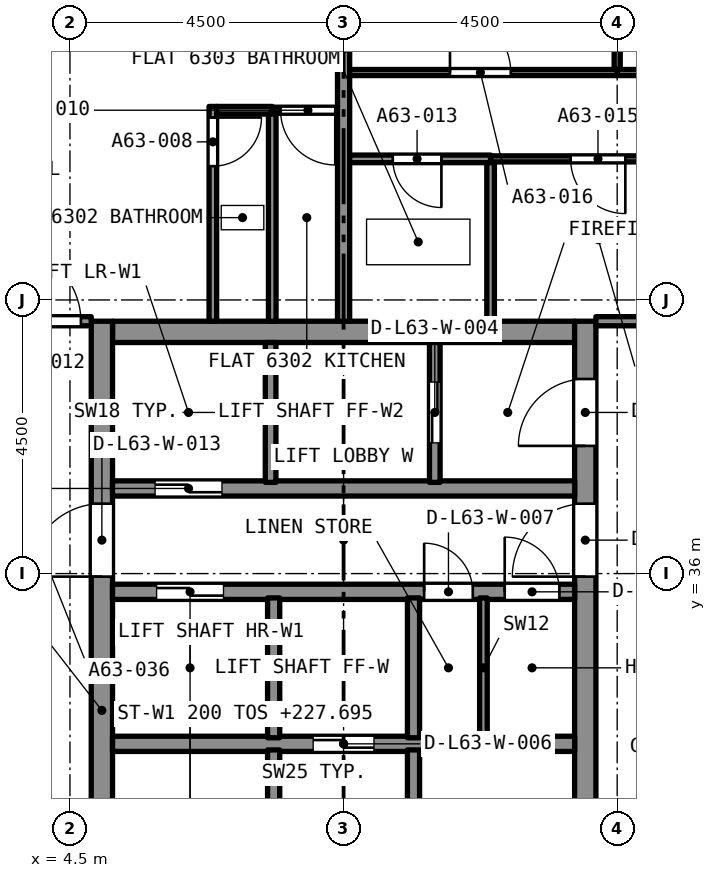
"""IFC4 building model, lengths in metres.
Left out: names, types, materials, properties, quantities, classifications, styles, units other than length and angle.
Written with IfcOpenShell. Run it as: python <this file> out.ifc"""

import sys

from ifc_helpers import new_model, si_unit, direction, frame, frame_2d, origin, place, context, subcontext, project, spatial, rectangle, extrude, element, fill, save


model = new_model("IFC4")
c1 = context("Model", 3, precision=1e-05, world=origin(), true_north=direction((0.0, 1.0)))
c2 = subcontext(c1, "Body", "Model", "MODEL_VIEW")
j1 = project(units=[si_unit("LENGTHUNIT", "METRE"), si_unit("PLANEANGLEUNIT", "RADIAN")], contexts=[c1])
p1 = place(None, origin())
s1 = spatial("IfcSite", under=j1, at=p1, CompositionType="ELEMENT")
p2 = place(p1, origin())
s2 = spatial("IfcBuilding", under=s1, at=p2, CompositionType="ELEMENT")
p3 = place(p2, frame((0.0, 0.0, 226.095)))
s3 = spatial("IfcBuildingStorey", under=s2, at=p3, CompositionType="ELEMENT", Elevation=226.095)
p4 = place(p3, frame((5.2, 39.975, 0.0), z_axis=(0.0, 0.0, 1.0), x_axis=(1.0, 0.0, 0.0)))
e1 = element("IfcWall", 1, at=p4, inside=s3, PredefinedType="SOLIDWALL", context=c2, shape_type="SweptSolid", body=[
    extrude(rectangle(XDim=7.6, YDim=0.35, at=frame_2d((3.8, 0.0))), origin(), (0.0, 0.0, 1.0), 3.2),
])
p5 = place(p3, frame((5.025, 27.35, 0.0), z_axis=(0.0, 0.0, 1.0), x_axis=(0.0, 1.0, 0.0)))
e2 = element("IfcWall", 2, at=p5, inside=s3, PredefinedType="SOLIDWALL", context=c2, shape_type="SweptSolid", body=[
    extrude(rectangle(XDim=12.8, YDim=0.35, at=frame_2d((6.4, 0.0))), origin(), (0.0, 0.0, 1.0), 3.2),
])
p6 = place(p5, frame((8.6, 0.0, 0.0)))
e3 = element("IfcOpeningElement", 3, at=p6, cuts=e2, PredefinedType="OPENING", context=c2, shape_type="SweptSolid", body=[
    extrude(rectangle(XDim=1.2, YDim=2.1, at=frame_2d((0.6, 1.05))), frame((0.0, 0.185, 0.0), z_axis=(0.0, -1.0, 0.0), x_axis=(1.0, 0.0, 0.0)), (0.0, 0.0, 1.0), 0.37),
])
p7 = place(p3, frame((12.975, 27.35, 0.0), z_axis=(0.0, 0.0, 1.0), x_axis=(0.0, 1.0, 0.0)))
e4 = element("IfcWall", 4, at=p7, inside=s3, PredefinedType="SOLIDWALL", context=c2, shape_type="SweptSolid", body=[
    extrude(rectangle(XDim=12.8, YDim=0.35, at=frame_2d((6.4, 0.0))), origin(), (0.0, 0.0, 1.0), 3.2),
])
p8 = place(p7, frame((10.75, 0.0, 0.0)))
e5 = element("IfcOpeningElement", 5, at=p8, cuts=e4, PredefinedType="OPENING", context=c2, shape_type="SweptSolid", body=[
    extrude(rectangle(XDim=1.1, YDim=2.1, at=frame_2d((0.55, 1.05))), frame((0.0, 0.185, 0.0), z_axis=(0.0, -1.0, 0.0), x_axis=(1.0, 0.0, 0.0)), (0.0, 0.0, 1.0), 0.37),
])
p9 = place(p7, frame((8.6, 0.0, 0.0)))
e6 = element("IfcOpeningElement", 6, at=p9, cuts=e4, PredefinedType="OPENING", context=c2, shape_type="SweptSolid", body=[
    extrude(rectangle(XDim=1.2, YDim=2.1, at=frame_2d((0.6, 1.05))), frame((0.0, 0.185, 0.0), z_axis=(0.0, -1.0, 0.0), x_axis=(1.0, 0.0, 0.0)), (0.0, 0.0, 1.0), 0.37),
])
p10 = place(p3, frame((6.85, 43.683, 0.0), z_axis=(0.0, 0.0, 1.0), x_axis=(0.0, -1.0, 0.0)))
e7 = element("IfcWall", 7, at=p10, inside=s3, PredefinedType="PARTITIONING", context=c2, shape_type="SweptSolid", body=[
    extrude(rectangle(XDim=3.533, YDim=0.125, at=frame_2d((1.766, 0.0))), origin(), (0.0, 0.0, 1.0), 2.9),
])
p11 = place(p10, frame((0.183, 0.0, 0.0)))
e8 = element("IfcOpeningElement", 8, at=p11, cuts=e7, PredefinedType="OPENING", context=c2, shape_type="SweptSolid", body=[
    extrude(rectangle(XDim=0.8, YDim=2.1, at=frame_2d((0.4, 1.05))), frame((0.0, 0.073, 0.0), z_axis=(0.0, -1.0, 0.0), x_axis=(1.0, 0.0, 0.0)), (0.0, 0.0, 1.0), 0.145),
])
p12 = place(p3, frame((6.913, 43.62, 0.0), z_axis=(0.0, 0.0, 1.0), x_axis=(1.0, 0.0, 0.0)))
e9 = element("IfcWall", 9, at=p12, inside=s3, PredefinedType="PARTITIONING", context=c2, shape_type="SweptSolid", body=[
    extrude(rectangle(XDim=0.915, YDim=0.125, at=frame_2d((0.458, 0.0))), origin(), (0.0, 0.0, 1.0), 2.9),
])
p13 = place(p3, frame((7.827, 40.15, 0.0), z_axis=(0.0, 0.0, 1.0), x_axis=(0.0, 1.0, 0.0)))
e10 = element("IfcWall", 10, at=p13, inside=s3, PredefinedType="PARTITIONING", context=c2, shape_type="SweptSolid", body=[
    extrude(rectangle(XDim=3.408, YDim=0.125, at=frame_2d((1.704, 0.0))), origin(), (0.0, 0.0, 1.0), 2.9),
])
p14 = place(p3, frame((8.9, 43.62, 0.0), z_axis=(0.0, 0.0, 1.0), x_axis=(-1.0, 0.0, 0.0)))
e11 = element("IfcWall", 11, at=p14, inside=s3, PredefinedType="PARTITIONING", context=c2, shape_type="SweptSolid", body=[
    extrude(rectangle(XDim=1.073, YDim=0.1, at=frame_2d((0.536, 0.0))), origin(), (0.0, 0.0, 1.0), 2.9),
])
p15 = place(p14, frame((0.036, 0.0, 0.0)))
e12 = element("IfcOpeningElement", 12, at=p15, cuts=e11, PredefinedType="OPENING", context=c2, shape_type="SweptSolid", body=[
    extrude(rectangle(XDim=0.9, YDim=2.1, at=frame_2d((0.45, 1.05))), frame((0.0, 0.06, 0.0), z_axis=(0.0, -1.0, 0.0), x_axis=(1.0, 0.0, 0.0)), (0.0, 0.0, 1.0), 0.12),
])
p16 = place(p3, frame((3.35, 40.15, 0.0), z_axis=(0.0, 0.0, 1.0), x_axis=(1.0, 0.0, 0.0)))
e13 = element("IfcWall", 13, at=p16, inside=s3, PredefinedType="PARTITIONING", context=c2, shape_type="SweptSolid", body=[
    extrude(rectangle(XDim=1.5, YDim=0.15, at=frame_2d((0.75, 0.0))), origin(), (0.0, 0.0, 1.0), 2.9),
])
p17 = place(p16, frame((0.13, 0.0, 0.0)))
e14 = element("IfcOpeningElement", 14, at=p17, cuts=e13, PredefinedType="OPENING", context=c2, shape_type="SweptSolid", body=[
    extrude(rectangle(XDim=1.2, YDim=2.4, at=frame_2d((0.6, 1.2))), frame((0.0, 0.085, 0.0), z_axis=(0.0, -1.0, 0.0), x_axis=(1.0, 0.0, 0.0)), (0.0, 0.0, 1.0), 0.17),
])
p18 = place(p3, frame((9.0, 40.15, 0.0), z_axis=(0.0, 0.0, 1.0), x_axis=(0.0, 1.0, 0.0)))
e15 = element("IfcWall", 15, at=p18, inside=s3, PredefinedType="PARTITIONING", context=c2, shape_type="SweptSolid", body=[
    extrude(rectangle(XDim=8.95, YDim=0.2, at=frame_2d((4.475, 0.0))), origin(), (0.0, 0.0, 1.0), 2.9),
])
p19 = place(p3, frame((11.418, 42.82, 0.0), z_axis=(0.0, 0.0, 1.0), x_axis=(-1.0, 0.0, 0.0)))
e16 = element("IfcWall", 16, at=p19, inside=s3, PredefinedType="PARTITIONING", context=c2, shape_type="SweptSolid", body=[
    extrude(rectangle(XDim=2.318, YDim=0.125, at=frame_2d((1.159, 0.0))), origin(), (0.0, 0.0, 1.0), 2.9),
])
p20 = place(p19, frame((0.809, 0.0, 0.0)))
e17 = element("IfcOpeningElement", 17, at=p20, cuts=e16, PredefinedType="OPENING", context=c2, shape_type="SweptSolid", body=[
    extrude(rectangle(XDim=0.8, YDim=2.1, at=frame_2d((0.4, 1.05))), frame((0.0, 0.073, 0.0), z_axis=(0.0, -1.0, 0.0), x_axis=(1.0, 0.0, 0.0)), (0.0, 0.0, 1.0), 0.145),
])
p21 = place(p3, frame((11.418, 40.15, 0.0), z_axis=(0.0, 0.0, 1.0), x_axis=(0.0, 1.0, 0.0)))
e18 = element("IfcWall", 18, at=p21, inside=s3, PredefinedType="PARTITIONING", context=c2, shape_type="SweptSolid", body=[
    extrude(rectangle(XDim=2.608, YDim=0.125, at=frame_2d((1.304, 0.0))), origin(), (0.0, 0.0, 1.0), 2.9),
])
p22 = place(p3, frame((13.5, 44.24, 0.0), z_axis=(0.0, 0.0, 1.0), x_axis=(1.0, 0.0, 0.0)))
e19 = element("IfcWall", 19, at=p22, inside=s3, PredefinedType="PARTITIONING", context=c2, shape_type="SweptSolid", body=[
    extrude(rectangle(XDim=4.375, YDim=0.1, at=frame_2d((2.188, 0.0))), origin(), (0.0, 0.0, 1.0), 2.9),
])
p23 = place(p22, frame((1.8, 0.0, 0.0)))
e20 = element("IfcOpeningElement", 20, at=p23, cuts=e19, PredefinedType="OPENING", context=c2, shape_type="SweptSolid", body=[
    extrude(rectangle(XDim=0.9, YDim=2.1, at=frame_2d((0.45, 1.05))), frame((0.0, 0.06, 0.0), z_axis=(0.0, -1.0, 0.0), x_axis=(1.0, 0.0, 0.0)), (0.0, 0.0, 1.0), 0.12),
])
p24 = place(p3, frame((13.5, 44.29, 0.0), z_axis=(0.0, 0.0, 1.0), x_axis=(0.0, 1.0, 0.0)))
e21 = element("IfcWall", 21, at=p24, inside=s3, PredefinedType="PARTITIONING", context=c2, shape_type="SweptSolid", body=[
    extrude(rectangle(XDim=4.81, YDim=0.1, at=frame_2d((2.405, 0.0))), origin(), (0.0, 0.0, 1.0), 2.9),
])
p25 = place(p3, frame((15.0, 42.82, 0.0), z_axis=(0.0, 0.0, 1.0), x_axis=(-1.0, 0.0, 0.0)))
e22 = element("IfcWall", 22, at=p25, inside=s3, PredefinedType="PARTITIONING", context=c2, shape_type="SweptSolid", body=[
    extrude(rectangle(XDim=3.582, YDim=0.1, at=frame_2d((1.791, 0.0))), origin(), (0.0, 0.0, 1.0), 2.9),
])
p26 = place(p25, frame((1.366, 0.0, 0.0)))
e23 = element("IfcOpeningElement", 23, at=p26, cuts=e22, PredefinedType="OPENING", context=c2, shape_type="SweptSolid", body=[
    extrude(rectangle(XDim=0.9, YDim=2.1, at=frame_2d((0.45, 1.05))), frame((0.0, 0.06, 0.0), z_axis=(0.0, -1.0, 0.0), x_axis=(1.0, 0.0, 0.0)), (0.0, 0.0, 1.0), 0.12),
])
p27 = place(p3, frame((9.1, 44.24, 0.0), z_axis=(0.0, 0.0, 1.0), x_axis=(1.0, 0.0, 0.0)))
e24 = element("IfcWall", 24, at=p27, inside=s3, PredefinedType="PARTITIONING", context=c2, shape_type="SweptSolid", body=[
    extrude(rectangle(XDim=4.4, YDim=0.1, at=frame_2d((2.2, 0.0))), origin(), (0.0, 0.0, 1.0), 2.9),
])
p28 = place(p27, frame((1.65, 0.0, 0.0)))
e25 = element("IfcOpeningElement", 25, at=p28, cuts=e24, PredefinedType="OPENING", context=c2, shape_type="SweptSolid", body=[
    extrude(rectangle(XDim=1.0, YDim=2.1, at=frame_2d((0.5, 1.05))), frame((0.0, 0.06, 0.0), z_axis=(0.0, -1.0, 0.0), x_axis=(1.0, 0.0, 0.0)), (0.0, 0.0, 1.0), 0.12),
])
p29 = place(p3, frame((13.15, 40.15, 0.0), z_axis=(0.0, 0.0, 1.0), x_axis=(1.0, 0.0, 0.0)))
e26 = element("IfcWall", 26, at=p29, inside=s3, PredefinedType="PARTITIONING", context=c2, shape_type="SweptSolid", body=[
    extrude(rectangle(XDim=1.8, YDim=0.15, at=frame_2d((0.9, 0.0))), origin(), (0.0, 0.0, 1.0), 2.9),
])
p30 = place(p3, frame((5.2, 33.2, 0.0), z_axis=(0.0, 0.0, 1.0), x_axis=(1.0, 0.0, 0.0)))
e27 = element("IfcWall", 27, at=p30, inside=s3, PredefinedType="SOLIDWALL", context=c2, shape_type="SweptSolid", body=[
    extrude(rectangle(XDim=7.6, YDim=0.25, at=frame_2d((3.8, 0.0))), origin(), (0.0, 0.0, 1.0), 2.9),
])
p31 = place(p30, frame((3.3, 0.0, 0.0)))
e28 = element("IfcOpeningElement", 28, at=p31, cuts=e27, PredefinedType="OPENING", context=c2, shape_type="SweptSolid", body=[
    extrude(rectangle(XDim=1.0, YDim=2.1, at=frame_2d((0.5, 1.05))), frame((0.0, 0.135, 0.0), z_axis=(0.0, -1.0, 0.0), x_axis=(1.0, 0.0, 0.0)), (0.0, 0.0, 1.0), 0.27),
])
p32 = place(p3, frame((5.2, 35.7, 0.0), z_axis=(0.0, 0.0, 1.0), x_axis=(1.0, 0.0, 0.0)))
e29 = element("IfcWall", 29, at=p32, inside=s3, PredefinedType="SOLIDWALL", context=c2, shape_type="SweptSolid", body=[
    extrude(rectangle(XDim=7.6, YDim=0.25, at=frame_2d((3.8, 0.0))), origin(), (0.0, 0.0, 1.0), 2.9),
])
p33 = place(p32, frame((0.725, 0.0, 0.0)))
e30 = element("IfcOpeningElement", 30, at=p33, cuts=e29, PredefinedType="OPENING", context=c2, shape_type="SweptSolid", body=[
    extrude(rectangle(XDim=1.1, YDim=2.4, at=frame_2d((0.55, 1.2))), frame((0.0, 0.135, 0.0), z_axis=(0.0, -1.0, 0.0), x_axis=(1.0, 0.0, 0.0)), (0.0, 0.0, 1.0), 0.27),
])
p34 = place(p32, frame((5.125, 0.0, 0.0)))
e31 = element("IfcOpeningElement", 31, at=p34, cuts=e29, PredefinedType="OPENING", context=c2, shape_type="SweptSolid", body=[
    extrude(rectangle(XDim=0.8, YDim=2.1, at=frame_2d((0.4, 1.05))), frame((0.0, 0.135, 0.0), z_axis=(0.0, -1.0, 0.0), x_axis=(1.0, 0.0, 0.0)), (0.0, 0.0, 1.0), 0.27),
])
p35 = place(p32, frame((6.45, 0.0, 0.0)))
e32 = element("IfcOpeningElement", 32, at=p35, cuts=e29, PredefinedType="OPENING", context=c2, shape_type="SweptSolid", body=[
    extrude(rectangle(XDim=0.9, YDim=2.1, at=frame_2d((0.45, 1.05))), frame((0.0, 0.135, 0.0), z_axis=(0.0, -1.0, 0.0), x_axis=(1.0, 0.0, 0.0)), (0.0, 0.0, 1.0), 0.27),
])
p36 = place(p3, frame((5.2, 37.4, 0.0), z_axis=(0.0, 0.0, 1.0), x_axis=(1.0, 0.0, 0.0)))
e33 = element("IfcWall", 33, at=p36, inside=s3, PredefinedType="SOLIDWALL", context=c2, shape_type="SweptSolid", body=[
    extrude(rectangle(XDim=7.6, YDim=0.25, at=frame_2d((3.8, 0.0))), origin(), (0.0, 0.0, 1.0), 2.9),
])
p37 = place(p36, frame((0.7, 0.0, 0.0)))
e34 = element("IfcOpeningElement", 34, at=p37, cuts=e33, PredefinedType="OPENING", context=c2, shape_type="SweptSolid", body=[
    extrude(rectangle(XDim=1.1, YDim=2.4, at=frame_2d((0.55, 1.2))), frame((0.0, 0.135, 0.0), z_axis=(0.0, -1.0, 0.0), x_axis=(1.0, 0.0, 0.0)), (0.0, 0.0, 1.0), 0.27),
])
p38 = place(p3, frame((7.85, 27.7, 0.0), z_axis=(0.0, 0.0, 1.0), x_axis=(0.0, 1.0, 0.0)))
e35 = element("IfcWall", 35, at=p38, inside=s3, PredefinedType="SOLIDWALL", context=c2, shape_type="SweptSolid", body=[
    extrude(rectangle(XDim=5.4, YDim=0.2, at=frame_2d((2.7, 0.0))), origin(), (0.0, 0.0, 1.0), 2.9),
])
p39 = place(p38, frame((0.2, 0.0, 0.0)))
e36 = element("IfcOpeningElement", 36, at=p39, cuts=e35, PredefinedType="OPENING", context=c2, shape_type="SweptSolid", body=[
    extrude(rectangle(XDim=0.9, YDim=2.1, at=frame_2d((0.45, 1.05))), frame((0.0, 0.11, 0.0), z_axis=(0.0, -1.0, 0.0), x_axis=(1.0, 0.0, 0.0)), (0.0, 0.0, 1.0), 0.22),
])
p40 = place(p3, frame((10.15, 27.7, 0.0), z_axis=(0.0, 0.0, 1.0), x_axis=(0.0, 1.0, 0.0)))
e37 = element("IfcWall", 37, at=p40, inside=s3, PredefinedType="SOLIDWALL", context=c2, shape_type="SweptSolid", body=[
    extrude(rectangle(XDim=5.4, YDim=0.2, at=frame_2d((2.7, 0.0))), origin(), (0.0, 0.0, 1.0), 2.9),
])
p41 = place(p40, frame((0.2, 0.0, 0.0)))
e38 = element("IfcOpeningElement", 38, at=p41, cuts=e37, PredefinedType="OPENING", context=c2, shape_type="SweptSolid", body=[
    extrude(rectangle(XDim=0.9, YDim=2.1, at=frame_2d((0.45, 1.05))), frame((0.0, 0.11, 0.0), z_axis=(0.0, -1.0, 0.0), x_axis=(1.0, 0.0, 0.0)), (0.0, 0.0, 1.0), 0.22),
])
for number, where, z_axis, x_axis in (
    (39, (7.85, 33.3, 0.0), (0.0, 0.0, 1.0), (0.0, 1.0, 0.0)),
    (40, (10.15, 33.3, 0.0), (0.0, 0.0, 1.0), (0.0, 1.0, 0.0)),
):
    element("IfcWall", number, at=place(p3, frame(where, z_axis=z_axis, x_axis=x_axis)), inside=s3, PredefinedType="SOLIDWALL", context=c2, shape_type="SweptSolid", body=[
        extrude(rectangle(XDim=2.3, YDim=0.2, at=frame_2d((1.15, 0.0))), origin(), (0.0, 0.0, 1.0), 2.9),
    ])
p42 = place(p3, frame((7.8, 37.5, 0.0), z_axis=(0.0, 0.0, 1.0), x_axis=(0.0, 1.0, 0.0)))
e41 = element("IfcWall", 41, at=p42, inside=s3, PredefinedType="SOLIDWALL", context=c2, shape_type="SweptSolid", body=[
    extrude(rectangle(XDim=2.3, YDim=0.175, at=frame_2d((1.15, 0.0))), origin(), (0.0, 0.0, 1.0), 2.9),
])
p43 = place(p3, frame((10.5, 37.5, 0.0), z_axis=(0.0, 0.0, 1.0), x_axis=(0.0, 1.0, 0.0)))
e42 = element("IfcWall", 42, at=p43, inside=s3, PredefinedType="SOLIDWALL", context=c2, shape_type="SweptSolid", body=[
    extrude(rectangle(XDim=2.3, YDim=0.175, at=frame_2d((1.15, 0.0))), origin(), (0.0, 0.0, 1.0), 2.9),
])
p44 = place(p43, frame((0.65, 0.0, 0.0)))
e43 = element("IfcOpeningElement", 43, at=p44, cuts=e42, PredefinedType="OPENING", context=c2, shape_type="SweptSolid", body=[
    extrude(rectangle(XDim=1.0, YDim=2.1, at=frame_2d((0.5, 1.05))), frame((0.0, 0.097, 0.0), z_axis=(0.0, -1.0, 0.0), x_axis=(1.0, 0.0, 0.0)), (0.0, 0.0, 1.0), 0.195),
])
p45 = place(p3, frame((11.3, 33.3, 0.0), z_axis=(0.0, 0.0, 1.0), x_axis=(0.0, 1.0, 0.0)))
e44 = element("IfcWall", 44, at=p45, inside=s3, PredefinedType="PARTITIONING", context=c2, shape_type="SweptSolid", body=[
    extrude(rectangle(XDim=2.3, YDim=0.125, at=frame_2d((1.15, 0.0))), origin(), (0.0, 0.0, 1.0), 2.9),
])
p46 = place(p11, origin())
e45 = element("IfcDoor", 45, at=p46, inside=s3, OperationType="SINGLE_SWING_LEFT", PredefinedType="DOOR", context=c2, shape_type="SweptSolid", body=[
    extrude(rectangle(XDim=0.8, YDim=2.1, at=frame_2d((0.4, 1.05))), frame((0.0, 0.025, 0.0), z_axis=(0.0, -1.0, 0.0), x_axis=(1.0, 0.0, 0.0)), (0.0, 0.0, 1.0), 0.05),
])
fill(e8, e45)
p47 = place(p15, origin())
e46 = element("IfcDoor", 46, at=p47, inside=s3, OperationType="SINGLE_SWING_LEFT", PredefinedType="DOOR", context=c2, shape_type="SweptSolid", body=[
    extrude(rectangle(XDim=0.9, YDim=2.1, at=frame_2d((0.45, 1.05))), frame((0.0, 0.025, 0.0), z_axis=(0.0, -1.0, 0.0), x_axis=(1.0, 0.0, 0.0)), (0.0, 0.0, 1.0), 0.05),
])
fill(e12, e46)
p48 = place(p17, origin())
e47 = element("IfcDoor", 47, at=p48, inside=s3, OperationType="SINGLE_SWING_LEFT", PredefinedType="DOOR", context=c2, shape_type="SweptSolid", body=[
    extrude(rectangle(XDim=1.2, YDim=2.4, at=frame_2d((0.6, 1.2))), frame((0.0, 0.025, 0.0), z_axis=(0.0, -1.0, 0.0), x_axis=(1.0, 0.0, 0.0)), (0.0, 0.0, 1.0), 0.05),
])
fill(e14, e47)
p49 = place(p20, origin())
e48 = element("IfcDoor", 48, at=p49, inside=s3, OperationType="SINGLE_SWING_RIGHT", PredefinedType="DOOR", context=c2, shape_type="SweptSolid", body=[
    extrude(rectangle(XDim=0.8, YDim=2.1, at=frame_2d((0.4, 1.05))), frame((0.0, 0.025, 0.0), z_axis=(0.0, -1.0, 0.0), x_axis=(1.0, 0.0, 0.0)), (0.0, 0.0, 1.0), 0.05),
])
fill(e17, e48)
p50 = place(p26, origin())
e49 = element("IfcDoor", 49, at=p50, inside=s3, OperationType="SINGLE_SWING_RIGHT", PredefinedType="DOOR", context=c2, shape_type="SweptSolid", body=[
    extrude(rectangle(XDim=0.9, YDim=2.1, at=frame_2d((0.45, 1.05))), frame((0.0, 0.025, 0.0), z_axis=(0.0, -1.0, 0.0), x_axis=(1.0, 0.0, 0.0)), (0.0, 0.0, 1.0), 0.05),
])
fill(e23, e49)
p51 = place(p28, origin())
e50 = element("IfcDoor", 50, at=p51, inside=s3, OperationType="SINGLE_SWING_LEFT", PredefinedType="DOOR", context=c2, shape_type="SweptSolid", body=[
    extrude(rectangle(XDim=1.0, YDim=2.1, at=frame_2d((0.5, 1.05))), frame((0.0, 0.025, 0.0), z_axis=(0.0, -1.0, 0.0), x_axis=(1.0, 0.0, 0.0)), (0.0, 0.0, 1.0), 0.05),
])
fill(e25, e50)
p52 = place(p37, origin())
e51 = element("IfcDoor", 51, at=p52, inside=s3, OperationType="SLIDING_TO_LEFT", PredefinedType="DOOR", context=c2, shape_type="SweptSolid", body=[
    extrude(rectangle(XDim=1.1, YDim=2.4, at=frame_2d((0.55, 1.2))), frame((0.0, 0.025, 0.0), z_axis=(0.0, -1.0, 0.0), x_axis=(1.0, 0.0, 0.0)), (0.0, 0.0, 1.0), 0.05),
])
fill(e34, e51)
p53 = place(p44, origin())
e52 = element("IfcDoor", 52, at=p53, inside=s3, OperationType="SLIDING_TO_LEFT", PredefinedType="DOOR", context=c2, shape_type="SweptSolid", body=[
    extrude(rectangle(XDim=1.0, YDim=2.1, at=frame_2d((0.5, 1.05))), frame((0.0, 0.025, 0.0), z_axis=(0.0, -1.0, 0.0), x_axis=(1.0, 0.0, 0.0)), (0.0, 0.0, 1.0), 0.05),
])
fill(e43, e52)
p54 = place(p33, origin())
e53 = element("IfcDoor", 53, at=p54, inside=s3, OperationType="SLIDING_TO_LEFT", PredefinedType="DOOR", context=c2, shape_type="SweptSolid", body=[
    extrude(rectangle(XDim=1.1, YDim=2.4, at=frame_2d((0.55, 1.2))), frame((0.0, 0.025, 0.0), z_axis=(0.0, -1.0, 0.0), x_axis=(1.0, 0.0, 0.0)), (0.0, 0.0, 1.0), 0.05),
])
fill(e30, e53)
p55 = place(p31, origin())
e54 = element("IfcDoor", 54, at=p55, inside=s3, OperationType="SLIDING_TO_LEFT", PredefinedType="DOOR", context=c2, shape_type="SweptSolid", body=[
    extrude(rectangle(XDim=1.0, YDim=2.1, at=frame_2d((0.5, 1.05))), frame((0.0, 0.025, 0.0), z_axis=(0.0, -1.0, 0.0), x_axis=(1.0, 0.0, 0.0)), (0.0, 0.0, 1.0), 0.05),
])
fill(e28, e54)
p56 = place(p34, origin())
e55 = element("IfcDoor", 55, at=p56, inside=s3, OperationType="SINGLE_SWING_LEFT", PredefinedType="DOOR", context=c2, shape_type="SweptSolid", body=[
    extrude(rectangle(XDim=0.8, YDim=2.1, at=frame_2d((0.4, 1.05))), frame((0.0, 0.025, 0.0), z_axis=(0.0, -1.0, 0.0), x_axis=(1.0, 0.0, 0.0)), (0.0, 0.0, 1.0), 0.05),
])
fill(e31, e55)
p57 = place(p35, origin())
e56 = element("IfcDoor", 56, at=p57, inside=s3, OperationType="SINGLE_SWING_LEFT", PredefinedType="DOOR", context=c2, shape_type="SweptSolid", body=[
    extrude(rectangle(XDim=0.9, YDim=2.1, at=frame_2d((0.45, 1.05))), frame((0.0, 0.025, 0.0), z_axis=(0.0, -1.0, 0.0), x_axis=(1.0, 0.0, 0.0)), (0.0, 0.0, 1.0), 0.05),
])
fill(e32, e56)
p58 = place(p8, origin())
e57 = element("IfcDoor", 57, at=p58, inside=s3, OperationType="SINGLE_SWING_LEFT", PredefinedType="DOOR", context=c2, shape_type="SweptSolid", body=[
    extrude(rectangle(XDim=1.1, YDim=2.1, at=frame_2d((0.55, 1.05))), frame((0.0, 0.025, 0.0), z_axis=(0.0, -1.0, 0.0), x_axis=(1.0, 0.0, 0.0)), (0.0, 0.0, 1.0), 0.05),
])
fill(e5, e57)
p59 = place(p6, origin())
e58 = element("IfcDoor", 58, at=p59, inside=s3, OperationType="SINGLE_SWING_LEFT", PredefinedType="DOOR", context=c2, shape_type="SweptSolid", body=[
    extrude(rectangle(XDim=1.2, YDim=2.1, at=frame_2d((0.6, 1.05))), frame((0.0, 0.025, 0.0), z_axis=(0.0, -1.0, 0.0), x_axis=(1.0, 0.0, 0.0)), (0.0, 0.0, 1.0), 0.05),
])
fill(e3, e58)
p60 = place(p9, origin())
e59 = element("IfcDoor", 59, at=p60, inside=s3, OperationType="SINGLE_SWING_LEFT", PredefinedType="DOOR", context=c2, shape_type="SweptSolid", body=[
    extrude(rectangle(XDim=1.2, YDim=2.1, at=frame_2d((0.6, 1.05))), frame((0.0, 0.025, 0.0), z_axis=(0.0, -1.0, 0.0), x_axis=(1.0, 0.0, 0.0)), (0.0, 0.0, 1.0), 0.05),
])
fill(e6, e59)
save(model, sys.argv[1])
